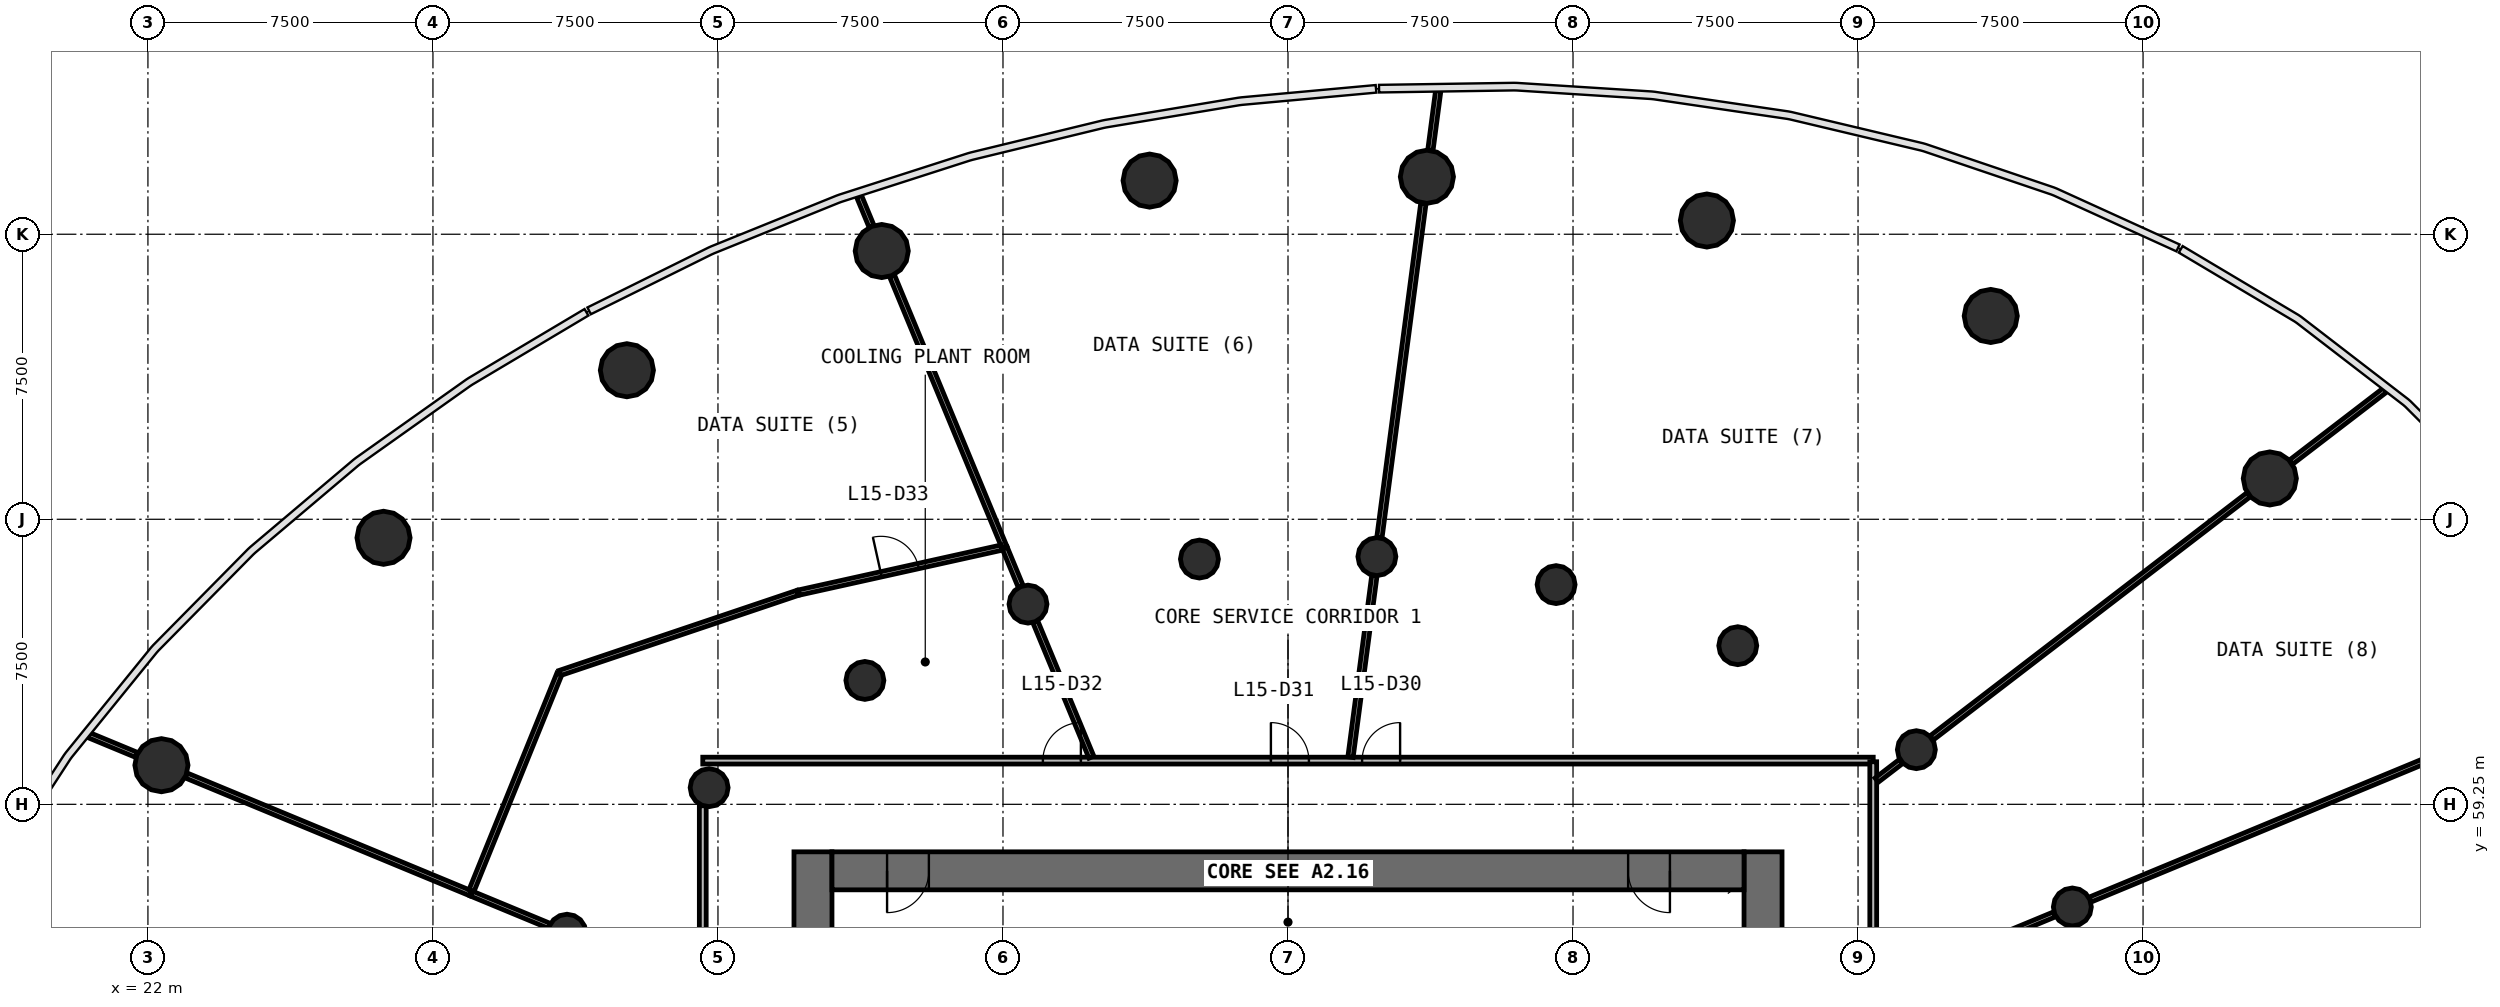
"""IFC4 building model, lengths in metres.
Left out: names, types, materials, properties, quantities, classifications, styles, units other than length and angle.
Written with IfcOpenShell. Run it as: python <this file> out.ifc"""

import sys

from ifc_helpers import new_model, si_unit, direction, frame, frame_2d, origin, origin_2d, place, context, subcontext, project, spatial, rectangle, circle, extrude, source, transform, mapped, element, fill, save


model = new_model("IFC4")
c1 = context("Model", 3, precision=1e-05, world=origin(), true_north=direction((0.0, 1.0)))
c2 = subcontext(c1, "Body", "Model", "MODEL_VIEW")
j1 = project(units=[si_unit("LENGTHUNIT", "METRE"), si_unit("PLANEANGLEUNIT", "RADIAN")], contexts=[c1])
p1 = place(None, origin())
s1 = spatial("IfcSite", under=j1, at=p1, CompositionType="ELEMENT")
p2 = place(p1, origin())
s2 = spatial("IfcBuilding", under=s1, at=p2, CompositionType="ELEMENT")
p3 = place(p2, frame((0.0, 0.0, 66.6)))
s3 = spatial("IfcBuildingStorey", under=s2, at=p3, CompositionType="ELEMENT", Elevation=66.6)
p4 = place(p3, frame((64.5, 38.0, 0.0), z_axis=(0.0, 0.0, 1.0), x_axis=(0.0, 1.0, 0.0)))
e1 = element("IfcWall", 1, at=p4, inside=s3, PredefinedType="SHEAR", context=c2, shape_type="SweptSolid", body=[
    extrude(rectangle(XDim=20.0, YDim=1.0, at=frame_2d((10.0, 0.0))), origin(), (0.0, 0.0, 1.0), 4.4),
])
p5 = place(p4, frame((9.1, 0.0, 0.0)))
e2 = element("IfcOpeningElement", 2, at=p5, cuts=e1, PredefinedType="OPENING", context=c2, shape_type="SweptSolid", body=[
    extrude(rectangle(XDim=1.8, YDim=2.1, at=frame_2d((0.9, 1.05))), frame((0.0, 0.51, 0.0), z_axis=(0.0, -1.0, 0.0), x_axis=(1.0, 0.0, 0.0)), (0.0, 0.0, 1.0), 1.02),
])
p6 = place(p3, frame((39.5, 58.0, 0.0), z_axis=(0.0, 0.0, 1.0), x_axis=(0.0, -1.0, 0.0)))
e3 = element("IfcWall", 3, at=p6, inside=s3, PredefinedType="SHEAR", context=c2, shape_type="SweptSolid", body=[
    extrude(rectangle(XDim=20.0, YDim=1.0, at=frame_2d((10.0, 0.0))), origin(), (0.0, 0.0, 1.0), 4.4),
])
p7 = place(p6, frame((9.1, 0.0, 0.0)))
e4 = element("IfcOpeningElement", 4, at=p7, cuts=e3, PredefinedType="OPENING", context=c2, shape_type="SweptSolid", body=[
    extrude(rectangle(XDim=1.8, YDim=2.1, at=frame_2d((0.9, 1.05))), frame((0.0, 0.51, 0.0), z_axis=(0.0, -1.0, 0.0), x_axis=(1.0, 0.0, 0.0)), (0.0, 0.0, 1.0), 1.02),
])
p8 = place(p3, frame((64.0, 57.5, 0.0), z_axis=(0.0, 0.0, 1.0), x_axis=(-1.0, 0.0, 0.0)))
e5 = element("IfcWall", 5, at=p8, inside=s3, PredefinedType="SHEAR", context=c2, shape_type="SweptSolid", body=[
    extrude(rectangle(XDim=24.0, YDim=1.0, at=frame_2d((12.0, 0.0))), origin(), (0.0, 0.0, 1.0), 4.4),
])
p9 = place(p8, frame((21.45, 0.0, 0.0)))
e6 = element("IfcOpeningElement", 6, at=p9, cuts=e5, PredefinedType="OPENING", context=c2, shape_type="SweptSolid", body=[
    extrude(rectangle(XDim=1.1, YDim=2.1, at=frame_2d((0.55, 1.05))), frame((0.0, 0.51, 0.0), z_axis=(0.0, -1.0, 0.0), x_axis=(1.0, 0.0, 0.0)), (0.0, 0.0, 1.0), 1.02),
])
p10 = place(p8, frame((1.95, 0.0, 0.0)))
e7 = element("IfcOpeningElement", 7, at=p10, cuts=e5, PredefinedType="OPENING", context=c2, shape_type="SweptSolid", body=[
    extrude(rectangle(XDim=1.1, YDim=2.1, at=frame_2d((0.55, 1.05))), frame((0.0, 0.51, 0.0), z_axis=(0.0, -1.0, 0.0), x_axis=(1.0, 0.0, 0.0)), (0.0, 0.0, 1.0), 1.02),
])
m1 = source(origin(), c2, "Body", "SweptSolid", [
    extrude(circle(Radius=0.7, at=origin_2d()), origin(), (0.0, 0.0, 1.0), 4.4),
])
for number, where, z_axis, x_axis in (
    (8, (77.836, 67.824, 0.0), (0.0, 0.0, 1.0), (1.0, 0.0, 0.0)),
    (9, (70.492, 72.1, 0.0), (0.0, 0.0, 1.0), (1.0, 0.0, 0.0)),
    (10, (63.023, 74.611, 0.0), (0.0, 0.0, 1.0), (1.0, 0.0, 0.0)),
    (11, (55.655, 75.761, 0.0), (0.0, 0.0, 1.0), (1.0, 0.0, 0.0)),
    (12, (48.358, 75.661, 0.0), (0.0, 0.0, 1.0), (1.0, 0.0, 0.0)),
    (13, (41.31, 73.809, 0.0), (0.0, 0.0, 1.0), (1.0, 0.0, 0.0)),
    (14, (34.604, 70.672, 0.0), (0.0, 0.0, 1.0), (1.0, 0.0, 0.0)),
    (15, (28.199, 66.263, 0.0), (0.0, 0.0, 1.0), (1.0, 0.0, 0.0)),
    (16, (22.355, 60.279, 0.0), (0.0, 0.0, 1.0), (1.0, 0.0, 0.0)),
):
    element("IfcColumn", number, at=place(p3, frame(where, z_axis=z_axis, x_axis=x_axis)), inside=s3, PredefinedType="COLUMN", context=c2, shape_type="MappedRepresentation", body=[
        mapped(m1, transform((0.0, 0.0, 0.0), scale=1.0)),
    ])
m2 = source(origin(), c2, "Body", "SweptSolid", [
    extrude(circle(Radius=0.5, at=origin_2d()), origin(), (0.0, 0.0, 1.0), 4.4),
])
for number, where, z_axis, x_axis in (
    (17, (72.639, 56.549, 0.0), (0.0, 0.0, 1.0), (1.0, 0.0, 0.0)),
    (18, (68.535, 60.688, 0.0), (0.0, 0.0, 1.0), (1.0, 0.0, 0.0)),
    (19, (63.835, 63.424, 0.0), (0.0, 0.0, 1.0), (1.0, 0.0, 0.0)),
    (20, (59.055, 65.031, 0.0), (0.0, 0.0, 1.0), (1.0, 0.0, 0.0)),
    (21, (54.339, 65.767, 0.0), (0.0, 0.0, 1.0), (1.0, 0.0, 0.0)),
    (22, (49.669, 65.703, 0.0), (0.0, 0.0, 1.0), (1.0, 0.0, 0.0)),
    (23, (45.158, 64.518, 0.0), (0.0, 0.0, 1.0), (1.0, 0.0, 0.0)),
    (24, (40.866, 62.51, 0.0), (0.0, 0.0, 1.0), (1.0, 0.0, 0.0)),
    (25, (36.768, 59.688, 0.0), (0.0, 0.0, 1.0), (1.0, 0.0, 0.0)),
    (26, (33.028, 55.859, 0.0), (0.0, 0.0, 1.0), (1.0, 0.0, 0.0)),
):
    element("IfcColumn", number, at=place(p3, frame(where, z_axis=z_axis, x_axis=x_axis)), inside=s3, PredefinedType="COLUMN", context=c2, shape_type="MappedRepresentation", body=[
        mapped(m2, transform((0.0, 0.0, 0.0), scale=1.0)),
    ])
p11 = place(p3, frame((36.6, 60.4, 0.0), z_axis=(0.0, 0.0, 1.0), x_axis=(1.0, 0.0, 0.0)))
e27 = element("IfcWall", 27, at=p11, inside=s3, PredefinedType="PARTITIONING", context=c2, shape_type="SweptSolid", body=[
    extrude(rectangle(XDim=30.8, YDim=0.18, at=frame_2d((15.4, 0.0))), origin(), (0.0, 0.0, 1.0), 3.05),
])
p12 = place(p11, frame((17.35, 0.0, 0.0)))
e28 = element("IfcOpeningElement", 28, at=p12, cuts=e27, PredefinedType="OPENING", context=c2, shape_type="SweptSolid", body=[
    extrude(rectangle(XDim=1.0, YDim=2.1, at=frame_2d((0.5, 1.05))), frame((0.0, 0.1, 0.0), z_axis=(0.0, -1.0, 0.0), x_axis=(1.0, 0.0, 0.0)), (0.0, 0.0, 1.0), 0.2),
])
p13 = place(p11, frame((14.95, 0.0, 0.0)))
e29 = element("IfcOpeningElement", 29, at=p13, cuts=e27, PredefinedType="OPENING", context=c2, shape_type="SweptSolid", body=[
    extrude(rectangle(XDim=1.0, YDim=2.1, at=frame_2d((0.5, 1.05))), frame((0.0, 0.1, 0.0), z_axis=(0.0, -1.0, 0.0), x_axis=(1.0, 0.0, 0.0)), (0.0, 0.0, 1.0), 0.2),
])
p14 = place(p11, frame((8.95, 0.0, 0.0)))
e30 = element("IfcOpeningElement", 30, at=p14, cuts=e27, PredefinedType="OPENING", context=c2, shape_type="SweptSolid", body=[
    extrude(rectangle(XDim=1.0, YDim=2.1, at=frame_2d((0.5, 1.05))), frame((0.0, 0.1, 0.0), z_axis=(0.0, -1.0, 0.0), x_axis=(1.0, 0.0, 0.0)), (0.0, 0.0, 1.0), 0.2),
])
p15 = place(p3, frame((67.4, 60.37, 0.0), z_axis=(0.0, 0.0, 1.0), x_axis=(0.0, -1.0, 0.0)))
e31 = element("IfcWall", 31, at=p15, inside=s3, PredefinedType="PARTITIONING", context=c2, shape_type="SweptSolid", body=[
    extrude(rectangle(XDim=23.583, YDim=0.18, at=frame_2d((11.791, 0.0))), origin(), (0.0, 0.0, 1.0), 3.05),
])
p16 = place(p15, frame((11.333, 0.0, 0.0)))
e32 = element("IfcOpeningElement", 32, at=p16, cuts=e31, PredefinedType="OPENING", context=c2, shape_type="SweptSolid", body=[
    extrude(rectangle(XDim=1.0, YDim=2.1, at=frame_2d((0.5, 1.05))), frame((0.0, 0.1, 0.0), z_axis=(0.0, -1.0, 0.0), x_axis=(1.0, 0.0, 0.0)), (0.0, 0.0, 1.0), 0.2),
])
p17 = place(p15, frame((4.532, 0.0, 0.0)))
e33 = element("IfcOpeningElement", 33, at=p17, cuts=e31, PredefinedType="OPENING", context=c2, shape_type="SweptSolid", body=[
    extrude(rectangle(XDim=1.0, YDim=2.1, at=frame_2d((0.5, 1.05))), frame((0.0, 0.1, 0.0), z_axis=(0.0, -1.0, 0.0), x_axis=(1.0, 0.0, 0.0)), (0.0, 0.0, 1.0), 0.2),
])
p18 = place(p3, frame((36.6, 35.63, 0.0), z_axis=(0.0, 0.0, 1.0), x_axis=(0.0, 1.0, 0.0)))
e34 = element("IfcWall", 34, at=p18, inside=s3, PredefinedType="PARTITIONING", context=c2, shape_type="SweptSolid", body=[
    extrude(rectangle(XDim=23.583, YDim=0.18, at=frame_2d((11.791, 0.0))), origin(), (0.0, 0.0, 1.0), 3.05),
])
p19 = place(p18, frame((14.732, 0.0, 0.0)))
e35 = element("IfcOpeningElement", 35, at=p19, cuts=e34, PredefinedType="OPENING", context=c2, shape_type="SweptSolid", body=[
    extrude(rectangle(XDim=1.0, YDim=2.1, at=frame_2d((0.5, 1.05))), frame((0.0, 0.1, 0.0), z_axis=(0.0, -1.0, 0.0), x_axis=(1.0, 0.0, 0.0)), (0.0, 0.0, 1.0), 0.2),
])
p20 = place(p18, frame((11.333, 0.0, 0.0)))
e36 = element("IfcOpeningElement", 36, at=p20, cuts=e34, PredefinedType="OPENING", context=c2, shape_type="SweptSolid", body=[
    extrude(rectangle(XDim=1.0, YDim=2.1, at=frame_2d((0.5, 1.05))), frame((0.0, 0.1, 0.0), z_axis=(0.0, -1.0, 0.0), x_axis=(1.0, 0.0, 0.0)), (0.0, 0.0, 1.0), 0.2),
])
p21 = place(p18, frame((9.133, 0.0, 0.0)))
e37 = element("IfcOpeningElement", 37, at=p21, cuts=e34, PredefinedType="OPENING", context=c2, shape_type="SweptSolid", body=[
    extrude(rectangle(XDim=1.0, YDim=2.1, at=frame_2d((0.5, 1.05))), frame((0.0, 0.1, 0.0), z_axis=(0.0, -1.0, 0.0), x_axis=(1.0, 0.0, 0.0)), (0.0, 0.0, 1.0), 0.2),
])
p22 = place(p3, frame((73.106, 56.742, 0.0), z_axis=(0.0, 0.0, 1.0), x_axis=(0.923875075531, 0.382694192291, 0.0)))
e38 = element("IfcWall", 38, at=p22, inside=s3, PredefinedType="PARTITIONING", context=c2, shape_type="SweptSolid", body=[
    extrude(rectangle(XDim=11.356, YDim=0.14, at=frame_2d((5.678, 0.0))), origin(), (0.0, 0.0, 1.0), 3.05),
])
p23 = place(p3, frame((68.935, 60.995, 0.0), z_axis=(0.0, 0.0, 1.0), x_axis=(0.793353660174, 0.608761012129, 0.0)))
e39 = element("IfcWall", 39, at=p23, inside=s3, PredefinedType="PARTITIONING", context=c2, shape_type="SweptSolid", body=[
    extrude(rectangle(XDim=10.515, YDim=0.14, at=frame_2d((5.257, 0.0))), origin(), (0.0, 0.0, 1.0), 3.05),
])
p24 = place(p3, frame((54.405, 66.267, 0.0), z_axis=(0.0, 0.0, 1.0), x_axis=(0.130521426482, 0.991445488783, 0.0)))
e40 = element("IfcWall", 40, at=p24, inside=s3, PredefinedType="PARTITIONING", context=c2, shape_type="SweptSolid", body=[
    extrude(rectangle(XDim=8.872, YDim=0.14, at=frame_2d((4.436, 0.0))), origin(), (0.0, 0.0, 1.0), 3.05),
])
p25 = place(p3, frame((30.487, 56.911, 0.0), z_axis=(0.0, 0.0, 1.0), x_axis=(-0.923876068888, 0.382691794185, 0.0)))
e41 = element("IfcWall", 41, at=p25, inside=s3, PredefinedType="PARTITIONING", context=c2, shape_type="SweptSolid", body=[
    extrude(rectangle(XDim=8.096, YDim=0.14, at=frame_2d((4.048, 0.0))), origin(), (0.0, 0.0, 1.0), 3.05),
])
p26 = place(p3, frame((44.536, 66.021, 0.0), z_axis=(0.0, 0.0, 1.0), x_axis=(-0.382675586032, 0.92388278253, 0.0)))
e42 = element("IfcWall", 42, at=p26, inside=s3, PredefinedType="PARTITIONING", context=c2, shape_type="SweptSolid", body=[
    extrude(rectangle(XDim=7.725, YDim=0.14, at=frame_2d((3.862, 0.0))), origin(), (0.0, 0.0, 1.0), 3.05),
])
p27 = place(p3, frame((39.098, 64.815, 0.0), z_axis=(0.0, 0.0, 1.0), x_axis=(-0.947628643264, -0.319374317166, 0.0)))
e43 = element("IfcWall", 43, at=p27, inside=s3, PredefinedType="PARTITIONING", context=c2, shape_type="SweptSolid", body=[
    extrude(rectangle(XDim=6.607, YDim=0.14, at=frame_2d((3.303, 0.0))), origin(), (0.0, 0.0, 1.0), 3.05),
])
p28 = place(p3, frame((32.825, 62.677, 0.0), z_axis=(0.0, 0.0, 1.0), x_axis=(-0.375902233723, -0.926659328277, 0.0)))
e44 = element("IfcWall", 44, at=p28, inside=s3, PredefinedType="PARTITIONING", context=c2, shape_type="SweptSolid", body=[
    extrude(rectangle(XDim=6.152, YDim=0.14, at=frame_2d((3.076, 0.0))), origin(), (0.0, 0.0, 1.0), 3.05),
])
p29 = place(p3, frame((39.127, 64.821, 0.0), z_axis=(0.0, 0.0, 1.0), x_axis=(0.976281499716, 0.216505042232, 0.0)))
e45 = element("IfcWall", 45, at=p29, inside=s3, PredefinedType="PARTITIONING", context=c2, shape_type="SweptSolid", body=[
    extrude(rectangle(XDim=5.469, YDim=0.14, at=frame_2d((2.734, 0.0))), origin(), (0.0, 0.0, 1.0), 3.05),
])
p30 = place(p29, frame((2.219, 0.0, 0.0)))
e46 = element("IfcOpeningElement", 46, at=p30, cuts=e45, PredefinedType="OPENING", context=c2, shape_type="SweptSolid", body=[
    extrude(rectangle(XDim=1.0, YDim=2.1, at=frame_2d((0.5, 1.05))), frame((0.0, 0.08, 0.0), z_axis=(0.0, -1.0, 0.0), x_axis=(1.0, 0.0, 0.0)), (0.0, 0.0, 1.0), 0.16),
])
p31 = place(p3, frame((67.49, 54.416, 0.0), z_axis=(0.0, 0.0, 1.0), x_axis=(0.923890025086, 0.382658100067, 0.0)))
e47 = element("IfcWall", 47, at=p31, inside=s3, PredefinedType="PARTITIONING", context=c2, shape_type="SweptSolid", body=[
    extrude(rectangle(XDim=5.068, YDim=0.14, at=frame_2d((2.534, 0.0))), origin(), (0.0, 0.0, 1.0), 3.05),
])
p32 = place(p3, frame((53.644, 60.49, 0.0), z_axis=(0.0, 0.0, 1.0), x_axis=(0.130523979823, 0.991445152639, 0.0)))
e48 = element("IfcWall", 48, at=p32, inside=s3, PredefinedType="PARTITIONING", context=c2, shape_type="SweptSolid", body=[
    extrude(rectangle(XDim=4.818, YDim=0.14, at=frame_2d((2.409, 0.0))), origin(), (0.0, 0.0, 1.0), 3.05),
])
p33 = place(p3, frame((46.826, 60.49, 0.0), z_axis=(0.0, 0.0, 1.0), x_axis=(-0.382644558062, 0.923895633817, 0.0)))
e49 = element("IfcWall", 49, at=p33, inside=s3, PredefinedType="PARTITIONING", context=c2, shape_type="SweptSolid", body=[
    extrude(rectangle(XDim=3.854, YDim=0.14, at=frame_2d((1.927, 0.0))), origin(), (0.0, 0.0, 1.0), 3.05),
])
p34 = place(p3, frame((78.394, 68.253, 0.0), z_axis=(0.0, 0.0, 1.0), x_axis=(0.793391027205, 0.608712311319, 0.0)))
e50 = element("IfcWall", 50, at=p34, inside=s3, PredefinedType="PARTITIONING", context=c2, shape_type="SweptSolid", body=[
    extrude(rectangle(XDim=3.121, YDim=0.14, at=frame_2d((1.561, 0.0))), origin(), (0.0, 0.0, 1.0), 3.05),
])
p35 = place(p3, frame((32.561, 56.052, 0.0), z_axis=(0.0, 0.0, 1.0), x_axis=(-0.923877119512, 0.382689257808, 0.0)))
e51 = element("IfcWall", 51, at=p35, inside=s3, PredefinedType="PARTITIONING", context=c2, shape_type="SweptSolid", body=[
    extrude(rectangle(XDim=2.215, YDim=0.14, at=frame_2d((1.107, 0.0))), origin(), (0.0, 0.0, 1.0), 3.05),
])
p36 = place(p3, frame((55.747, 76.46, 0.0), z_axis=(0.0, 0.0, 1.0), x_axis=(0.130454512571, 0.991454295543, 0.0)))
e52 = element("IfcWall", 52, at=p36, inside=s3, PredefinedType="PARTITIONING", context=c2, shape_type="SweptSolid", body=[
    extrude(rectangle(XDim=1.581, YDim=0.14, at=frame_2d((0.791, 0.0))), origin(), (0.0, 0.0, 1.0), 3.05),
])
p37 = place(p3, frame((21.704, 60.549, 0.0), z_axis=(0.0, 0.0, 1.0), x_axis=(-0.923894797396, 0.382646577594, 0.0)))
e53 = element("IfcWall", 53, at=p37, inside=s3, PredefinedType="PARTITIONING", context=c2, shape_type="SweptSolid", body=[
    extrude(rectangle(XDim=1.365, YDim=0.14, at=frame_2d((0.683, 0.0))), origin(), (0.0, 0.0, 1.0), 3.05),
])
p38 = place(p3, frame((44.965, 64.984, 0.0), z_axis=(0.0, 0.0, 1.0), x_axis=(-0.382773041214, 0.923842410219, 0.0)))
e54 = element("IfcWall", 54, at=p38, inside=s3, PredefinedType="PARTITIONING", context=c2, shape_type="SweptSolid", body=[
    extrude(rectangle(XDim=1.092, YDim=0.14, at=frame_2d((0.546, 0.0))), origin(), (0.0, 0.0, 1.0), 3.05),
])
p39 = place(p3, frame((67.49, 59.886, 0.0), z_axis=(0.0, 0.0, 1.0), x_axis=(0.793316076519, 0.608809989025, 0.0)))
e55 = element("IfcWall", 55, at=p39, inside=s3, PredefinedType="PARTITIONING", context=c2, shape_type="SweptSolid", body=[
    extrude(rectangle(XDim=0.812, YDim=0.14, at=frame_2d((0.406, 0.0))), origin(), (0.0, 0.0, 1.0), 3.05),
])
p40 = place(p3, frame((41.04, 74.46, 0.0), z_axis=(0.0, 0.0, 1.0), x_axis=(-0.382660776335, 0.923888916621, 0.0)))
e56 = element("IfcWall", 56, at=p40, inside=s3, PredefinedType="PARTITIONING", context=c2, shape_type="SweptSolid", body=[
    extrude(rectangle(XDim=0.861, YDim=0.14, at=frame_2d((0.43, 0.0))), origin(), (0.0, 0.0, 1.0), 3.05),
])
m3 = source(origin(), c2, "Body", "SweptSolid", [
    extrude(rectangle(XDim=1.1, YDim=2.1, at=frame_2d((0.55, 1.05))), frame((0.0, 0.025, 0.0), z_axis=(0.0, -1.0, 0.0), x_axis=(1.0, 0.0, 0.0)), (0.0, 0.0, 1.0), 0.05),
])
p41 = place(p9, origin())
e57 = element("IfcDoor", 57, at=p41, inside=s3, OperationType="SINGLE_SWING_RIGHT", PredefinedType="DOOR", context=c2, shape_type="MappedRepresentation", body=[
    mapped(m3, transform((0.0, 0.0, 0.0), scale=1.0)),
])
fill(e6, e57)
p42 = place(p10, origin())
e58 = element("IfcDoor", 58, at=p42, inside=s3, OperationType="SINGLE_SWING_LEFT", PredefinedType="DOOR", context=c2, shape_type="MappedRepresentation", body=[
    mapped(m3, transform((0.0, 0.0, 0.0), scale=1.0)),
])
fill(e7, e58)
m4 = source(origin(), c2, "Body", "SweptSolid", [
    extrude(rectangle(XDim=1.0, YDim=2.1, at=frame_2d((0.5, 1.05))), frame((0.0, 0.025, 0.0), z_axis=(0.0, -1.0, 0.0), x_axis=(1.0, 0.0, 0.0)), (0.0, 0.0, 1.0), 0.05),
])
p43 = place(p12, origin())
e59 = element("IfcDoor", 59, at=p43, inside=s3, OperationType="SINGLE_SWING_RIGHT", PredefinedType="DOOR", context=c2, shape_type="MappedRepresentation", body=[
    mapped(m4, transform((0.0, 0.0, 0.0), scale=1.0)),
])
fill(e28, e59)
p44 = place(p13, origin())
e60 = element("IfcDoor", 60, at=p44, inside=s3, OperationType="SINGLE_SWING_LEFT", PredefinedType="DOOR", context=c2, shape_type="MappedRepresentation", body=[
    mapped(m4, transform((0.0, 0.0, 0.0), scale=1.0)),
])
fill(e29, e60)
p45 = place(p14, origin())
e61 = element("IfcDoor", 61, at=p45, inside=s3, OperationType="SINGLE_SWING_RIGHT", PredefinedType="DOOR", context=c2, shape_type="MappedRepresentation", body=[
    mapped(m4, transform((0.0, 0.0, 0.0), scale=1.0)),
])
fill(e30, e61)
p46 = place(p30, origin())
e62 = element("IfcDoor", 62, at=p46, inside=s3, OperationType="SINGLE_SWING_LEFT", PredefinedType="DOOR", context=c2, shape_type="MappedRepresentation", body=[
    mapped(m4, transform((0.0, 0.0, 0.0), scale=1.0)),
])
fill(e46, e62)
save(model, sys.argv[1])
